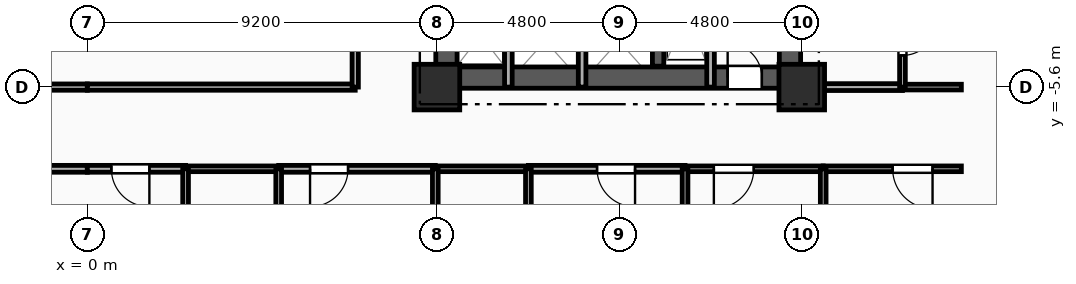
"""IFC4 building model, lengths in metres.
Left out: names, types, materials, properties, quantities, classifications, styles, units other than length and angle.
Written with IfcOpenShell. Run it as: python <this file> out.ifc"""

import sys

from ifc_helpers import new_model, si_unit, direction, frame, frame_2d, origin, origin_2d, place, context, subcontext, project, spatial, rectangle, extrude, element, fill, save


model = new_model("IFC4")
c1 = context("Model", 3, precision=1e-05, world=origin(), true_north=direction((0.0, 1.0)))
c2 = subcontext(c1, "Body", "Model", "MODEL_VIEW")
j1 = project(units=[si_unit("LENGTHUNIT", "METRE"), si_unit("PLANEANGLEUNIT", "RADIAN")], contexts=[c1])
p1 = place(None, origin())
s1 = spatial("IfcSite", under=j1, at=p1, CompositionType="ELEMENT")
p2 = place(p1, origin())
s2 = spatial("IfcBuilding", under=s1, at=p2, CompositionType="ELEMENT")
p3 = place(p2, frame((0.0, 0.0, 57.15)))
s3 = spatial("IfcBuildingStorey", under=s2, at=p3, CompositionType="ELEMENT", Elevation=57.15)
for number, where, z_axis, x_axis in (
    (1, (9.2, -5.6, 0.0), (0.0, 0.0, 1.0), (1.0, 0.0, 0.0)),
    (2, (18.8, -5.6, 0.0), (0.0, 0.0, 1.0), (1.0, 0.0, 0.0)),
):
    element("IfcColumn", number, at=place(p3, frame(where, z_axis=z_axis, x_axis=x_axis)), inside=s3, PredefinedType="COLUMN", context=c2, shape_type="SweptSolid", body=[
        extrude(rectangle(XDim=1.2, YDim=1.2, at=origin_2d()), origin(), (0.0, 0.0, 1.0), 3.35),
    ])
p4 = place(p3, frame((9.2, -5.35, 0.0), z_axis=(0.0, 0.0, 1.0), x_axis=(1.0, 0.0, 0.0)))
e3 = element("IfcWall", 3, at=p4, inside=s3, PredefinedType="SHEAR", context=c2, shape_type="SweptSolid", body=[
    extrude(rectangle(XDim=9.6, YDim=0.56, at=frame_2d((4.8, 0.0))), origin(), (0.0, 0.0, 1.0), 3.035),
])
p5 = place(p4, frame((7.65, 0.0, 0.0)))
e4 = element("IfcOpeningElement", 4, at=p5, cuts=e3, PredefinedType="OPENING", context=c2, shape_type="SweptSolid", body=[
    extrude(rectangle(XDim=0.9, YDim=2.1, at=frame_2d((0.45, 1.05))), frame((0.0, 0.29, 0.0), z_axis=(0.0, -1.0, 0.0), x_axis=(1.0, 0.0, 0.0)), (0.0, 0.0, 1.0), 0.58),
])
p6 = place(p3, frame((9.45, -5.05, 0.0), z_axis=(0.0, 0.0, 1.0), x_axis=(0.0, 1.0, 0.0)))
e5 = element("IfcWall", 5, at=p6, inside=s3, PredefinedType="SHEAR", context=c2, shape_type="SweptSolid", body=[
    extrude(rectangle(XDim=10.1, YDim=0.56, at=frame_2d((5.05, 0.0))), origin(), (0.0, 0.0, 1.0), 3.035),
])
p7 = place(p6, frame((7.15, 0.0, 0.0)))
e6 = element("IfcOpeningElement", 6, at=p7, cuts=e5, PredefinedType="OPENING", context=c2, shape_type="SweptSolid", body=[
    extrude(rectangle(XDim=0.9, YDim=2.1, at=frame_2d((0.45, 1.05))), frame((0.0, 0.29, 0.0), z_axis=(0.0, -1.0, 0.0), x_axis=(1.0, 0.0, 0.0)), (0.0, 0.0, 1.0), 0.58),
])
p8 = place(p6, frame((2.4, 0.0, 0.0)))
e7 = element("IfcOpeningElement", 7, at=p8, cuts=e5, PredefinedType="OPENING", context=c2, shape_type="SweptSolid", body=[
    extrude(rectangle(XDim=1.2, YDim=2.15, at=frame_2d((0.6, 1.075))), frame((0.0, 0.29, 0.0), z_axis=(0.0, -1.0, 0.0), x_axis=(1.0, 0.0, 0.0)), (0.0, 0.0, 1.0), 0.58),
])
p9 = place(p3, frame((18.49, -5.05, 0.0), z_axis=(0.0, 0.0, 1.0), x_axis=(0.0, 1.0, 0.0)))
e8 = element("IfcWall", 8, at=p9, inside=s3, PredefinedType="SHEAR", context=c2, shape_type="SweptSolid", body=[
    extrude(rectangle(XDim=10.1, YDim=0.56, at=frame_2d((5.05, 0.0))), origin(), (0.0, 0.0, 1.0), 3.035),
])
p10 = place(p3, frame((15.02, -5.05, 0.0), z_axis=(0.0, 0.0, 1.0), x_axis=(0.0, 1.0, 0.0)))
e9 = element("IfcWall", 9, at=p10, inside=s3, PredefinedType="SHEAR", context=c2, shape_type="SweptSolid", body=[
    extrude(rectangle(XDim=10.1, YDim=0.3, at=frame_2d((5.05, 0.0))), origin(), (0.0, 0.0, 1.0), 3.035),
])
p11 = place(p3, frame((16.4, -2.11, 0.0), z_axis=(0.0, 0.0, 1.0), x_axis=(0.0, -1.0, 0.0)))
e10 = element("IfcWall", 10, at=p11, inside=s3, PredefinedType="PARTITIONING", context=c2, shape_type="SweptSolid", body=[
    extrude(rectangle(XDim=3.49, YDim=0.2, at=frame_2d((1.745, 0.0))), origin(), (0.0, 0.0, 1.0), 3.035),
])
for number, where, z_axis, x_axis in (
    (11, (11.08, -5.6, 0.0), (0.0, 0.0, 1.0), (0.0, 1.0, 0.0)),
    (12, (13.02, -5.6, 0.0), (0.0, 0.0, 1.0), (0.0, 1.0, 0.0)),
):
    element("IfcWall", number, at=place(p3, frame(where, z_axis=z_axis, x_axis=x_axis)), inside=s3, PredefinedType="PARTITIONING", context=c2, shape_type="SweptSolid", body=[
        extrude(rectangle(XDim=2.25, YDim=0.2, at=frame_2d((1.125, 0.0))), origin(), (0.0, 0.0, 1.0), 3.035),
    ])
p12 = place(p3, frame((0.0, -7.75, 0.0), z_axis=(0.0, 0.0, 1.0), x_axis=(-1.0, 0.0, 0.0)))
e13 = element("IfcWall", 13, at=p12, inside=s3, PredefinedType="PARTITIONING", context=c2, shape_type="SweptSolid", body=[
    extrude(rectangle(XDim=1.536, YDim=0.18, at=frame_2d((0.768, 0.0))), origin(), (0.0, 0.0, 1.0), 3.035),
])
p13 = place(p3, frame((-7.05, -5.6, 0.0), z_axis=(0.0, 0.0, 1.0), x_axis=(1.0, 0.0, 0.0)))
e14 = element("IfcWall", 14, at=p13, inside=s3, PredefinedType="PARTITIONING", context=c2, shape_type="SweptSolid", body=[
    extrude(rectangle(XDim=7.05, YDim=0.165, at=frame_2d((3.525, 0.0))), origin(), (0.0, 0.0, 1.0), 2.52),
])
p14 = place(p13, frame((4.728, 0.0, 0.0)))
e15 = element("IfcOpeningElement", 15, at=p14, cuts=e14, PredefinedType="OPENING", context=c2, shape_type="SweptSolid", body=[
    extrude(rectangle(XDim=1.15, YDim=2.15, at=frame_2d((0.575, 1.075))), frame((0.0, 0.093, 0.0), z_axis=(0.0, -1.0, 0.0), x_axis=(1.0, 0.0, 0.0)), (0.0, 0.0, 1.0), 0.185),
])
p15 = place(p3, frame((18.8, -5.6, 0.0), z_axis=(0.0, 0.0, 1.0), x_axis=(1.0, 0.0, 0.0)))
e16 = element("IfcWall", 16, at=p15, inside=s3, PredefinedType="PARTITIONING", context=c2, shape_type="SweptSolid", body=[
    extrude(rectangle(XDim=2.65, YDim=0.18, at=frame_2d((1.325, 0.0))), origin(), (0.0, 0.0, 1.0), 3.035),
])
p16 = place(p3, frame((21.45, -5.6, 0.0), z_axis=(0.0, 0.0, 1.0), x_axis=(1.0, 0.0, 0.0)))
e17 = element("IfcWall", 17, at=p16, inside=s3, PredefinedType="PLUMBINGWALL", context=c2, shape_type="SweptSolid", body=[
    extrude(rectangle(XDim=1.55, YDim=0.15, at=frame_2d((0.775, 0.0))), origin(), (0.0, 0.0, 1.0), 3.035),
])
p17 = place(p3, frame((2.586, -7.75, 0.0), z_axis=(0.0, 0.0, 1.0), x_axis=(-1.0, 0.0, 0.0)))
e18 = element("IfcWall", 18, at=p17, inside=s3, PredefinedType="PARTITIONING", context=c2, shape_type="SweptSolid", body=[
    extrude(rectangle(XDim=2.586, YDim=0.18, at=frame_2d((1.293, 0.0))), origin(), (0.0, 0.0, 1.0), 3.035),
])
p18 = place(p17, frame((0.953, 0.0, 0.0)))
e19 = element("IfcOpeningElement", 19, at=p18, cuts=e18, PredefinedType="OPENING", context=c2, shape_type="SweptSolid", body=[
    extrude(rectangle(XDim=1.0, YDim=2.15, at=frame_2d((0.5, 1.075))), frame((0.0, 0.1, 0.0), z_axis=(0.0, -1.0, 0.0), x_axis=(1.0, 0.0, 0.0)), (0.0, 0.0, 1.0), 0.2),
])
p19 = place(p3, frame((9.157, -7.75, 0.0), z_axis=(0.0, 0.0, 1.0), x_axis=(-1.0, 0.0, 0.0)))
e20 = element("IfcWall", 20, at=p19, inside=s3, PredefinedType="PARTITIONING", context=c2, shape_type="SweptSolid", body=[
    extrude(rectangle(XDim=4.121, YDim=0.18, at=frame_2d((2.061, 0.0))), origin(), (0.0, 0.0, 1.0), 3.035),
])
p20 = place(p19, frame((2.296, 0.0, 0.0)))
e21 = element("IfcOpeningElement", 21, at=p20, cuts=e20, PredefinedType="OPENING", context=c2, shape_type="SweptSolid", body=[
    extrude(rectangle(XDim=1.0, YDim=2.15, at=frame_2d((0.5, 1.075))), frame((0.0, 0.1, 0.0), z_axis=(0.0, -1.0, 0.0), x_axis=(1.0, 0.0, 0.0)), (0.0, 0.0, 1.0), 0.2),
])
p21 = place(p3, frame((5.036, -7.75, 0.0), z_axis=(0.0, 0.0, 1.0), x_axis=(-1.0, 0.0, 0.0)))
e22 = element("IfcWall", 22, at=p21, inside=s3, PredefinedType="PLUMBINGWALL", context=c2, shape_type="SweptSolid", body=[
    extrude(rectangle(XDim=2.45, YDim=0.15, at=frame_2d((1.225, 0.0))), origin(), (0.0, 0.0, 1.0), 3.035),
])
p22 = place(p3, frame((15.729, -7.75, 0.0), z_axis=(0.0, 0.0, 1.0), x_axis=(-1.0, 0.0, 0.0)))
e23 = element("IfcWall", 23, at=p22, inside=s3, PredefinedType="PARTITIONING", context=c2, shape_type="SweptSolid", body=[
    extrude(rectangle(XDim=4.122, YDim=0.18, at=frame_2d((2.061, 0.0))), origin(), (0.0, 0.0, 1.0), 3.035),
])
p23 = place(p22, frame((1.316, 0.0, 0.0)))
e24 = element("IfcOpeningElement", 24, at=p23, cuts=e23, PredefinedType="OPENING", context=c2, shape_type="SweptSolid", body=[
    extrude(rectangle(XDim=1.0, YDim=2.15, at=frame_2d((0.5, 1.075))), frame((0.0, 0.1, 0.0), z_axis=(0.0, -1.0, 0.0), x_axis=(1.0, 0.0, 0.0)), (0.0, 0.0, 1.0), 0.2),
])
p24 = place(p3, frame((11.607, -7.75, 0.0), z_axis=(0.0, 0.0, 1.0), x_axis=(-1.0, 0.0, 0.0)))
e25 = element("IfcWall", 25, at=p24, inside=s3, PredefinedType="PLUMBINGWALL", context=c2, shape_type="SweptSolid", body=[
    extrude(rectangle(XDim=2.45, YDim=0.15, at=frame_2d((1.225, 0.0))), origin(), (0.0, 0.0, 1.0), 3.035),
])
p25 = place(p3, frame((19.365, -7.75, 0.0), z_axis=(0.0, 0.0, 1.0), x_axis=(-1.0, 0.0, 0.0)))
e26 = element("IfcWall", 26, at=p25, inside=s3, PredefinedType="PARTITIONING", context=c2, shape_type="SweptSolid", body=[
    extrude(rectangle(XDim=3.635, YDim=0.15, at=frame_2d((1.818, 0.0))), origin(), (0.0, 0.0, 1.0), 3.035),
])
p26 = place(p25, frame((1.827, 0.0, 0.0)))
e27 = element("IfcOpeningElement", 27, at=p26, cuts=e26, PredefinedType="OPENING", context=c2, shape_type="SweptSolid", body=[
    extrude(rectangle(XDim=1.05, YDim=2.15, at=frame_2d((0.525, 1.075))), frame((0.0, 0.085, 0.0), z_axis=(0.0, -1.0, 0.0), x_axis=(1.0, 0.0, 0.0)), (0.0, 0.0, 1.0), 0.17),
])
p27 = place(p3, frame((23.0, -7.75, 0.0), z_axis=(0.0, 0.0, 1.0), x_axis=(-1.0, 0.0, 0.0)))
e28 = element("IfcWall", 28, at=p27, inside=s3, PredefinedType="PARTITIONING", context=c2, shape_type="SweptSolid", body=[
    extrude(rectangle(XDim=3.635, YDim=0.15, at=frame_2d((1.818, 0.0))), origin(), (0.0, 0.0, 1.0), 3.035),
])
p28 = place(p27, frame((0.758, 0.0, 0.0)))
e29 = element("IfcOpeningElement", 29, at=p28, cuts=e28, PredefinedType="OPENING", context=c2, shape_type="SweptSolid", body=[
    extrude(rectangle(XDim=1.05, YDim=2.15, at=frame_2d((0.525, 1.075))), frame((0.0, 0.085, 0.0), z_axis=(0.0, -1.0, 0.0), x_axis=(1.0, 0.0, 0.0)), (0.0, 0.0, 1.0), 0.17),
])
p29 = place(p3, frame((0.0, -5.6, 0.0), z_axis=(0.0, 0.0, 1.0), x_axis=(1.0, 0.0, 0.0)))
e30 = element("IfcWall", 30, at=p29, inside=s3, PredefinedType="PARTITIONING", context=c2, shape_type="SweptSolid", body=[
    extrude(rectangle(XDim=7.05, YDim=0.165, at=frame_2d((3.525, 0.0))), origin(), (0.0, 0.0, 1.0), 2.52),
])
p30 = place(p3, frame((7.05, -5.6, 0.0), z_axis=(0.0, 0.0, 1.0), x_axis=(0.0, 1.0, 0.0)))
e31 = element("IfcWall", 31, at=p30, inside=s3, PredefinedType="PARTITIONING", context=c2, shape_type="SweptSolid", body=[
    extrude(rectangle(XDim=7.05, YDim=0.165, at=frame_2d((3.525, 0.0))), origin(), (0.0, 0.0, 1.0), 3.035),
])
p31 = place(p3, frame((21.45, -3.25, 0.0), z_axis=(0.0, 0.0, 1.0), x_axis=(0.0, -1.0, 0.0)))
e32 = element("IfcWall", 32, at=p31, inside=s3, PredefinedType="PLUMBINGWALL", context=c2, shape_type="SweptSolid", body=[
    extrude(rectangle(XDim=2.35, YDim=0.15, at=frame_2d((1.175, 0.0))), origin(), (0.0, 0.0, 1.0), 3.035),
])
p32 = place(p31, frame((0.616, 0.0, 0.0)))
e33 = element("IfcOpeningElement", 33, at=p32, cuts=e32, PredefinedType="OPENING", context=c2, shape_type="SweptSolid", body=[
    extrude(rectangle(XDim=0.9, YDim=2.1, at=frame_2d((0.45, 1.05))), frame((0.0, 0.085, 0.0), z_axis=(0.0, -1.0, 0.0), x_axis=(1.0, 0.0, 0.0)), (0.0, 0.0, 1.0), 0.17),
])
for number, where, z_axis, x_axis in (
    (34, (2.586, -7.75, 0.0), (0.0, 0.0, 1.0), (0.0, -1.0, 0.0)),
    (35, (5.036, -9.9, 0.0), (0.0, 0.0, 1.0), (0.0, 1.0, 0.0)),
):
    element("IfcWall", number, at=place(p3, frame(where, z_axis=z_axis, x_axis=x_axis)), inside=s3, PredefinedType="PLUMBINGWALL", context=c2, shape_type="SweptSolid", body=[
        extrude(rectangle(XDim=2.15, YDim=0.15, at=frame_2d((1.075, 0.0))), origin(), (0.0, 0.0, 1.0), 3.035),
    ])
p33 = place(p3, frame((9.157, -7.75, 0.0), z_axis=(0.0, 0.0, 1.0), x_axis=(0.0, -1.0, 0.0)))
e36 = element("IfcWall", 36, at=p33, inside=s3, PredefinedType="PLUMBINGWALL", context=c2, shape_type="SweptSolid", body=[
    extrude(rectangle(XDim=2.15, YDim=0.15, at=frame_2d((1.075, 0.0))), origin(), (0.0, 0.0, 1.0), 2.52),
])
p34 = place(p3, frame((11.607, -9.9, 0.0), z_axis=(0.0, 0.0, 1.0), x_axis=(0.0, 1.0, 0.0)))
e37 = element("IfcWall", 37, at=p34, inside=s3, PredefinedType="PLUMBINGWALL", context=c2, shape_type="SweptSolid", body=[
    extrude(rectangle(XDim=2.15, YDim=0.15, at=frame_2d((1.075, 0.0))), origin(), (0.0, 0.0, 1.0), 3.035),
])
for number, where, z_axis, x_axis in (
    (38, (15.729, -7.75, 0.0), (0.0, 0.0, 1.0), (0.0, -1.0, 0.0)),
    (39, (19.365, -7.75, 0.0), (0.0, 0.0, 1.0), (0.0, -1.0, 0.0)),
):
    element("IfcWall", number, at=place(p3, frame(where, z_axis=z_axis, x_axis=x_axis)), inside=s3, PredefinedType="PARTITIONING", context=c2, shape_type="SweptSolid", body=[
        extrude(rectangle(XDim=11.65, YDim=0.15, at=frame_2d((5.825, 0.0))), origin(), (0.0, 0.0, 1.0), 3.035),
    ])
p35 = place(p5, origin())
e40 = element("IfcDoor", 40, at=p35, inside=s3, OperationType="SINGLE_SWING_LEFT", PredefinedType="DOOR", context=c2, shape_type="SweptSolid", body=[
    extrude(rectangle(XDim=0.9, YDim=2.1, at=frame_2d((0.45, 1.05))), frame((0.0, 0.025, 0.0), z_axis=(0.0, -1.0, 0.0), x_axis=(1.0, 0.0, 0.0)), (0.0, 0.0, 1.0), 0.05),
])
fill(e4, e40)
p36 = place(p18, origin())
e41 = element("IfcDoor", 41, at=p36, inside=s3, OperationType="SINGLE_SWING_LEFT", PredefinedType="DOOR", context=c2, shape_type="SweptSolid", body=[
    extrude(rectangle(XDim=1.0, YDim=2.15, at=frame_2d((0.5, 1.075))), frame((0.0, 0.025, 0.0), z_axis=(0.0, -1.0, 0.0), x_axis=(1.0, 0.0, 0.0)), (0.0, 0.0, 1.0), 0.05),
])
fill(e19, e41)
p37 = place(p20, origin())
e42 = element("IfcDoor", 42, at=p37, inside=s3, OperationType="SINGLE_SWING_RIGHT", PredefinedType="DOOR", context=c2, shape_type="SweptSolid", body=[
    extrude(rectangle(XDim=1.0, YDim=2.15, at=frame_2d((0.5, 1.075))), frame((0.0, 0.025, 0.0), z_axis=(0.0, -1.0, 0.0), x_axis=(1.0, 0.0, 0.0)), (0.0, 0.0, 1.0), 0.05),
])
fill(e21, e42)
p38 = place(p23, origin())
e43 = element("IfcDoor", 43, at=p38, inside=s3, OperationType="SINGLE_SWING_LEFT", PredefinedType="DOOR", context=c2, shape_type="SweptSolid", body=[
    extrude(rectangle(XDim=1.0, YDim=2.15, at=frame_2d((0.5, 1.075))), frame((0.0, 0.025, 0.0), z_axis=(0.0, -1.0, 0.0), x_axis=(1.0, 0.0, 0.0)), (0.0, 0.0, 1.0), 0.05),
])
fill(e24, e43)
p39 = place(p26, origin())
e44 = element("IfcDoor", 44, at=p39, inside=s3, OperationType="SINGLE_SWING_RIGHT", PredefinedType="DOOR", context=c2, shape_type="SweptSolid", body=[
    extrude(rectangle(XDim=1.05, YDim=2.15, at=frame_2d((0.525, 1.075))), frame((0.0, 0.025, 0.0), z_axis=(0.0, -1.0, 0.0), x_axis=(1.0, 0.0, 0.0)), (0.0, 0.0, 1.0), 0.05),
])
fill(e27, e44)
p40 = place(p28, origin())
e45 = element("IfcDoor", 45, at=p40, inside=s3, OperationType="SINGLE_SWING_LEFT", PredefinedType="DOOR", context=c2, shape_type="SweptSolid", body=[
    extrude(rectangle(XDim=1.05, YDim=2.15, at=frame_2d((0.525, 1.075))), frame((0.0, 0.025, 0.0), z_axis=(0.0, -1.0, 0.0), x_axis=(1.0, 0.0, 0.0)), (0.0, 0.0, 1.0), 0.05),
])
fill(e29, e45)
p41 = place(p32, origin())
e46 = element("IfcDoor", 46, at=p41, inside=s3, OperationType="SINGLE_SWING_LEFT", PredefinedType="DOOR", context=c2, shape_type="SweptSolid", body=[
    extrude(rectangle(XDim=0.9, YDim=2.1, at=frame_2d((0.45, 1.05))), frame((0.0, 0.025, 0.0), z_axis=(0.0, -1.0, 0.0), x_axis=(1.0, 0.0, 0.0)), (0.0, 0.0, 1.0), 0.05),
])
fill(e33, e46)
save(model, sys.argv[1])
